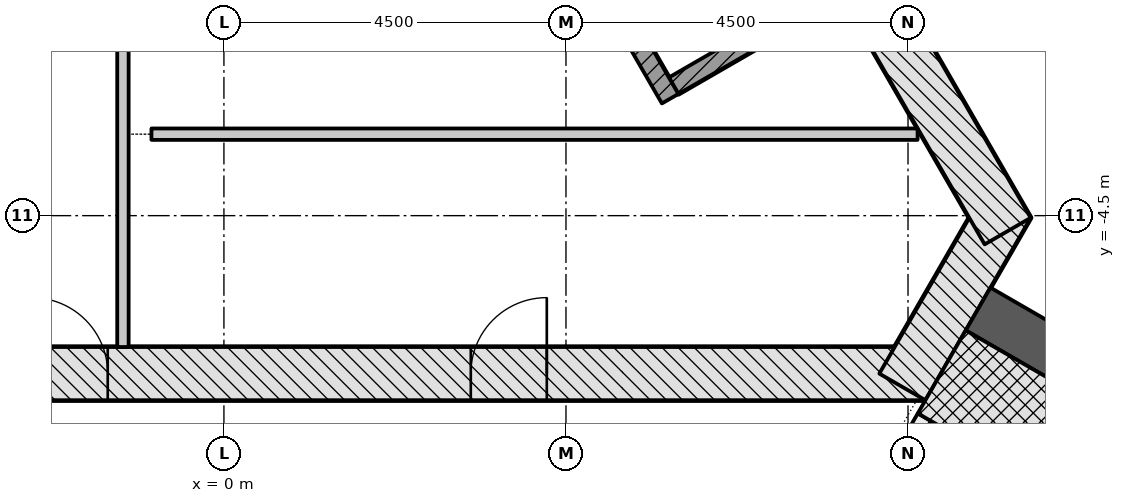
"""IFC4 building model, lengths in metres.
Left out: names, types, materials, properties, quantities, classifications, styles, units other than length and angle.
Written with IfcOpenShell. Run it as: python <this file> out.ifc"""

import sys

from ifc_helpers import new_model, si_unit, direction, frame, frame_2d, origin, place, context, subcontext, project, spatial, rectangle, extrude, element, fill, save


model = new_model("IFC4")
c1 = context("Model", 3, precision=1e-05, world=origin(), true_north=direction((0.0, 1.0)))
c2 = subcontext(c1, "Body", "Model", "MODEL_VIEW")
j1 = project(units=[si_unit("LENGTHUNIT", "METRE"), si_unit("PLANEANGLEUNIT", "RADIAN")], contexts=[c1])
p1 = place(None, origin())
s1 = spatial("IfcSite", under=j1, at=p1, CompositionType="ELEMENT")
p2 = place(p1, origin())
s2 = spatial("IfcBuilding", under=s1, at=p2, CompositionType="ELEMENT")
p3 = place(p2, frame((0.0, 0.0, 214.8)))
s3 = spatial("IfcBuildingStorey", under=s2, at=p3, CompositionType="ELEMENT", Elevation=214.8)
p4 = place(p3, frame((-9.229, -6.578, -0.2), z_axis=(0.0, 0.0, 1.0), x_axis=(1.0, 0.0, 0.0)))
e1 = element("IfcWall", 1, at=p4, inside=s3, PredefinedType="SHEAR", context=c2, shape_type="SweptSolid", body=[
    extrude(rectangle(XDim=18.458, YDim=0.7, at=frame_2d((9.229, 0.0))), origin(), (0.0, 0.0, 1.0), 3.6),
])
p5 = place(p4, frame((6.7, 0.0, 0.2)))
e2 = element("IfcOpeningElement", 2, at=p5, cuts=e1, PredefinedType="OPENING", context=c2, shape_type="SweptSolid", body=[
    extrude(rectangle(XDim=1.0, YDim=2.1, at=frame_2d((0.5, 1.05))), frame((0.0, 0.36, 0.0), z_axis=(0.0, -1.0, 0.0), x_axis=(1.0, 0.0, 0.0)), (0.0, 0.0, 1.0), 0.72),
])
p6 = place(p4, frame((1.452, 0.0, 0.2)))
e3 = element("IfcOpeningElement", 3, at=p6, cuts=e1, PredefinedType="OPENING", context=c2, shape_type="SweptSolid", body=[
    extrude(rectangle(XDim=0.9, YDim=2.1, at=frame_2d((0.45, 1.05))), frame((0.0, 0.36, 0.0), z_axis=(0.0, -1.0, 0.0), x_axis=(1.0, 0.0, 0.0)), (0.0, 0.0, 1.0), 0.72),
])
p7 = place(p4, frame((4.45, 0.0, 0.2)))
e4 = element("IfcOpeningElement", 4, at=p7, cuts=e1, PredefinedType="OPENING", context=c2, shape_type="SweptSolid", body=[
    extrude(rectangle(XDim=1.0, YDim=2.1, at=frame_2d((0.5, 1.05))), frame((0.0, 0.36, 0.0), z_axis=(0.0, -1.0, 0.0), x_axis=(1.0, 0.0, 0.0)), (0.0, 0.0, 1.0), 0.72),
])
p8 = place(p4, frame((12.477, 0.0, 0.2)))
e5 = element("IfcOpeningElement", 5, at=p8, cuts=e1, PredefinedType="OPENING", context=c2, shape_type="SweptSolid", body=[
    extrude(rectangle(XDim=1.0, YDim=2.1, at=frame_2d((0.5, 1.05))), frame((0.0, 0.36, 0.0), z_axis=(0.0, -1.0, 0.0), x_axis=(1.0, 0.0, 0.0)), (0.0, 0.0, 1.0), 0.72),
])
p9 = place(p3, frame((8.926, -6.753, -0.2), z_axis=(0.0, 0.0, 1.0), x_axis=(0.500042739161, 0.866000726912, 0.0)))
e6 = element("IfcWall", 6, at=p9, inside=s3, PredefinedType="SHEAR", context=c2, shape_type="SweptSolid", body=[
    extrude(rectangle(XDim=2.771, YDim=0.7, at=frame_2d((1.386, 0.0))), origin(), (0.0, 0.0, 1.0), 3.6),
])
p10 = place(p3, frame((10.311, -4.703, -0.2), z_axis=(0.0, 0.0, 1.0), x_axis=(-0.500001446645, 0.866024568562, 0.0)))
e7 = element("IfcWall", 7, at=p10, inside=s3, PredefinedType="SHEAR", context=c2, shape_type="SweptSolid", body=[
    extrude(rectangle(XDim=18.458, YDim=0.7, at=frame_2d((9.229, 0.0))), origin(), (0.0, 0.0, 1.0), 3.6),
])
p11 = place(p10, frame((4.379, 0.0, 0.2)))
e8 = element("IfcOpeningElement", 8, at=p11, cuts=e7, PredefinedType="OPENING", context=c2, shape_type="SweptSolid", body=[
    extrude(rectangle(XDim=1.1, YDim=2.1, at=frame_2d((0.55, 1.05))), frame((0.0, 0.36, 0.0), z_axis=(0.0, -1.0, 0.0), x_axis=(1.0, 0.0, 0.0)), (0.0, 0.0, 1.0), 0.72),
])
p12 = place(p10, frame((6.529, 0.0, 0.2)))
e9 = element("IfcOpeningElement", 9, at=p12, cuts=e7, PredefinedType="OPENING", context=c2, shape_type="SweptSolid", body=[
    extrude(rectangle(XDim=1.1, YDim=2.1, at=frame_2d((0.55, 1.05))), frame((0.0, 0.36, 0.0), z_axis=(0.0, -1.0, 0.0), x_axis=(1.0, 0.0, 0.0)), (0.0, 0.0, 1.0), 0.72),
])
p13 = place(p10, frame((8.679, 0.0, 0.2)))
e10 = element("IfcOpeningElement", 10, at=p13, cuts=e7, PredefinedType="OPENING", context=c2, shape_type="SweptSolid", body=[
    extrude(rectangle(XDim=1.1, YDim=2.1, at=frame_2d((0.55, 1.05))), frame((0.0, 0.36, 0.0), z_axis=(0.0, -1.0, 0.0), x_axis=(1.0, 0.0, 0.0)), (0.0, 0.0, 1.0), 0.72),
])
p14 = place(p10, frame((10.829, 0.0, 0.2)))
e11 = element("IfcOpeningElement", 11, at=p14, cuts=e7, PredefinedType="OPENING", context=c2, shape_type="SweptSolid", body=[
    extrude(rectangle(XDim=1.1, YDim=2.1, at=frame_2d((0.55, 1.05))), frame((0.0, 0.36, 0.0), z_axis=(0.0, -1.0, 0.0), x_axis=(1.0, 0.0, 0.0)), (0.0, 0.0, 1.0), 0.72),
])
p15 = place(p10, frame((12.979, 0.0, 0.2)))
e12 = element("IfcOpeningElement", 12, at=p15, cuts=e7, PredefinedType="OPENING", context=c2, shape_type="SweptSolid", body=[
    extrude(rectangle(XDim=1.1, YDim=2.1, at=frame_2d((0.55, 1.05))), frame((0.0, 0.36, 0.0), z_axis=(0.0, -1.0, 0.0), x_axis=(1.0, 0.0, 0.0)), (0.0, 0.0, 1.0), 0.72),
])
p16 = place(p3, frame((-1.083, 11.281, -0.2), z_axis=(0.0, 0.0, 1.0), x_axis=(-0.500001446645, -0.866024568562, 0.0)))
e13 = element("IfcWall", 13, at=p16, inside=s3, PredefinedType="SHEAR", context=c2, shape_type="SweptSolid", body=[
    extrude(rectangle(XDim=18.458, YDim=0.7, at=frame_2d((9.229, 0.0))), origin(), (0.0, 0.0, 1.0), 3.6),
])
p17 = place(p16, frame((8.979, 0.0, 0.2)))
e14 = element("IfcOpeningElement", 14, at=p17, cuts=e13, PredefinedType="OPENING", context=c2, shape_type="SweptSolid", body=[
    extrude(rectangle(XDim=1.2, YDim=2.1, at=frame_2d((0.6, 1.05))), frame((0.0, 0.36, 0.0), z_axis=(0.0, -1.0, 0.0), x_axis=(1.0, 0.0, 0.0)), (0.0, 0.0, 1.0), 0.72),
])
p18 = place(p16, frame((11.029, 0.0, 0.2)))
e15 = element("IfcOpeningElement", 15, at=p18, cuts=e13, PredefinedType="OPENING", context=c2, shape_type="SweptSolid", body=[
    extrude(rectangle(XDim=1.2, YDim=2.1, at=frame_2d((0.6, 1.05))), frame((0.0, 0.36, 0.0), z_axis=(0.0, -1.0, 0.0), x_axis=(1.0, 0.0, 0.0)), (0.0, 0.0, 1.0), 0.72),
])
p19 = place(p3, frame((9.922, -5.728, -0.2), z_axis=(0.0, 0.0, 1.0), x_axis=(0.866030911543, -0.499990460161, 0.0)))
e16 = element("IfcWall", 16, at=p19, inside=s3, PredefinedType="SHEAR", context=c2, shape_type="SweptSolid", body=[
    extrude(rectangle(XDim=8.359, YDim=0.65, at=frame_2d((4.179, 0.0))), origin(), (0.0, 0.0, 1.0), 3.6),
])
p20 = place(p3, frame((8.081, -1.541, -0.2), z_axis=(0.0, 0.0, 1.0), x_axis=(-0.866022959057, -0.500004234368, 0.0)))
e17 = element("IfcWall", 17, at=p20, inside=s3, PredefinedType="PARTITIONING", context=c2, shape_type="SweptSolid", body=[
    extrude(rectangle(XDim=2.5, YDim=0.25, at=frame_2d((1.25, 0.0))), origin(), (0.0, 0.0, 1.0), 3.6),
])
p21 = place(p3, frame((5.87, -2.961, 0.0), z_axis=(0.0, 0.0, 1.0), x_axis=(-0.50000615651, 0.866021849293, 0.0)))
e18 = element("IfcWall", 18, at=p21, inside=s3, PredefinedType="PARTITIONING", context=c2, shape_type="SweptSolid", body=[
    extrude(rectangle(XDim=11.0, YDim=0.25, at=frame_2d((5.5, 0.0))), origin(), (0.0, 0.0, 1.0), 3.4),
])
p22 = place(p3, frame((-1.329, 1.597, 0.0), z_axis=(0.0, 0.0, 1.0), x_axis=(0.0, -1.0, 0.0)))
e19 = element("IfcWall", 19, at=p22, inside=s3, PredefinedType="PARTITIONING", context=c2, shape_type="SweptSolid", body=[
    extrude(rectangle(XDim=7.825, YDim=0.15, at=frame_2d((3.913, 0.0))), origin(), (0.0, 0.0, 1.0), 3.4),
])
p23 = place(p22, frame((2.063, 0.0, 0.0)))
e20 = element("IfcOpeningElement", 20, at=p23, cuts=e19, PredefinedType="OPENING", context=c2, shape_type="SweptSolid", body=[
    extrude(rectangle(XDim=0.9, YDim=2.1, at=frame_2d((0.45, 1.05))), frame((0.0, 0.085, 0.0), z_axis=(0.0, -1.0, 0.0), x_axis=(1.0, 0.0, 0.0)), (0.0, 0.0, 1.0), 0.17),
])
p24 = place(p3, frame((-0.954, -3.428, 0.0), z_axis=(0.0, 0.0, 1.0), x_axis=(1.0, 0.0, 0.0)))
e21 = element("IfcWall", 21, at=p24, inside=s3, PredefinedType="PARTITIONING", context=c2, shape_type="SweptSolid", body=[
    extrude(rectangle(XDim=10.08, YDim=0.15, at=frame_2d((5.04, 0.0))), origin(), (0.0, 0.0, 1.0), 3.4),
])
p25 = place(p3, frame((7.44, -10.226, -0.2), z_axis=(0.0, 0.0, 1.0), x_axis=(0.500022077904, 0.866012656725, 0.0)))
e22 = element("IfcWall", 22, at=p25, inside=s3, PredefinedType="SHEAR", context=c2, shape_type="SweptSolid", body=[
    extrude(rectangle(XDim=3.55, YDim=0.2, at=frame_2d((1.775, 0.0))), origin(), (0.0, 0.0, 1.0), 3.6),
])
p26 = place(p25, frame((1.175, 0.0, 0.2)))
e23 = element("IfcOpeningElement", 23, at=p26, cuts=e22, PredefinedType="OPENING", context=c2, shape_type="SweptSolid", body=[
    extrude(rectangle(XDim=1.2, YDim=2.1, at=frame_2d((0.6, 1.05))), frame((0.0, 0.11, 0.0), z_axis=(0.0, -1.0, 0.0), x_axis=(1.0, 0.0, 0.0)), (0.0, 0.0, 1.0), 0.22),
])
p27 = place(p3, frame((9.444, -6.555, -0.2), z_axis=(0.0, 0.0, 1.0), x_axis=(0.866018442252, -0.500012057535, 0.0)))
e24 = element("IfcWall", 24, at=p27, inside=s3, PredefinedType="SHEAR", context=c2, shape_type="SweptSolid", body=[
    extrude(rectangle(XDim=7.2, YDim=1.261, at=frame_2d((3.6, 0.0))), origin(), (0.0, 0.0, 1.0), 3.6),
])
p28 = place(p3, frame((15.832, -8.765, 0.0), z_axis=(0.0, 0.0, 1.0), x_axis=(-0.500005035328, 0.866022496617, 0.0)))
e25 = element("IfcWall", 25, at=p28, inside=s3, PredefinedType="PARTITIONING", context=c2, shape_type="SweptSolid", body=[
    extrude(rectangle(XDim=11.343, YDim=0.15, at=frame_2d((5.671, 0.0))), origin(), (0.0, 0.0, 1.0), 2.852),
])
p29 = place(p5, origin())
e26 = element("IfcDoor", 26, at=p29, inside=s3, OperationType="SINGLE_SWING_LEFT", PredefinedType="DOOR", context=c2, shape_type="SweptSolid", body=[
    extrude(rectangle(XDim=1.0, YDim=2.1, at=frame_2d((0.5, 1.05))), frame((0.0, 0.075, 0.0), z_axis=(0.0, -1.0, 0.0), x_axis=(1.0, 0.0, 0.0)), (0.0, 0.0, 1.0), 0.15),
])
fill(e2, e26)
p30 = place(p8, origin())
e27 = element("IfcDoor", 27, at=p30, inside=s3, OperationType="SINGLE_SWING_RIGHT", PredefinedType="DOOR", context=c2, shape_type="SweptSolid", body=[
    extrude(rectangle(XDim=1.0, YDim=2.1, at=frame_2d((0.5, 1.05))), frame((0.0, 0.075, 0.0), z_axis=(0.0, -1.0, 0.0), x_axis=(1.0, 0.0, 0.0)), (0.0, 0.0, 1.0), 0.15),
])
fill(e5, e27)
save(model, sys.argv[1])
